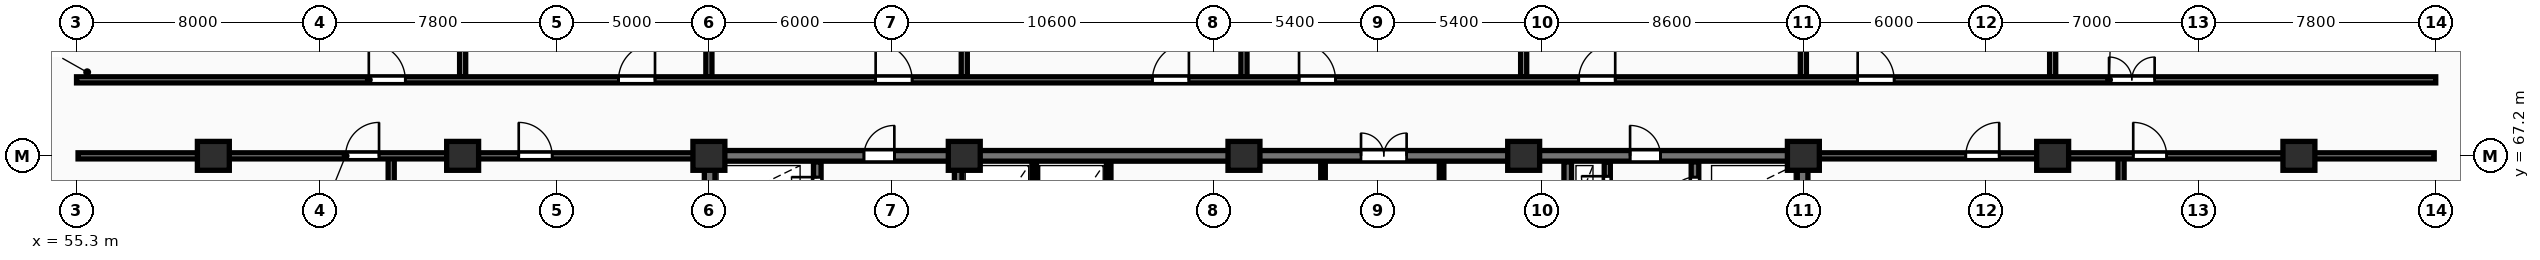
"""IFC4 building model, lengths in metres.
Left out: names, types, materials, properties, quantities, classifications, styles, units other than length and angle.
Written with IfcOpenShell. Run it as: python <this file> out.ifc"""

import sys

from ifc_helpers import new_model, si_unit, direction, frame, frame_2d, origin, origin_2d, place, context, subcontext, project, spatial, rectangle, extrude, element, fill, save


model = new_model("IFC4")
c1 = context("Model", 3, precision=1e-05, world=origin(), true_north=direction((0.0, 1.0)))
c2 = subcontext(c1, "Body", "Model", "MODEL_VIEW")
j1 = project(units=[si_unit("LENGTHUNIT", "METRE"), si_unit("PLANEANGLEUNIT", "RADIAN")], contexts=[c1])
p1 = place(None, origin())
s1 = spatial("IfcSite", under=j1, at=p1, CompositionType="ELEMENT")
p2 = place(p1, origin())
s2 = spatial("IfcBuilding", under=s1, at=p2, CompositionType="ELEMENT")
p3 = place(p2, frame((0.0, 0.0, 76.0)))
s3 = spatial("IfcBuildingStorey", under=s2, at=p3, CompositionType="ELEMENT", Elevation=76.0)
for number, where, z_axis, x_axis in (
    (1, (59.8, 67.2, 0.0), (0.0, 0.0, 1.0), (1.0, 0.0, 0.0)),
    (2, (68.0, 67.2, 0.0), (0.0, 0.0, 1.0), (1.0, 0.0, 0.0)),
    (3, (76.1, 67.2, 0.0), (0.0, 0.0, 1.0), (1.0, 0.0, 0.0)),
    (4, (84.5, 67.2, 0.0), (0.0, 0.0, 1.0), (1.0, 0.0, 0.0)),
    (5, (93.7, 67.2, 0.0), (0.0, 0.0, 1.0), (1.0, 0.0, 0.0)),
    (6, (102.9, 67.2, 0.0), (0.0, 0.0, 1.0), (1.0, 0.0, 0.0)),
    (7, (112.1, 67.2, 0.0), (0.0, 0.0, 1.0), (1.0, 0.0, 0.0)),
    (8, (120.3, 67.2, 0.0), (0.0, 0.0, 1.0), (1.0, 0.0, 0.0)),
    (9, (128.4, 67.2, 0.0), (0.0, 0.0, 1.0), (1.0, 0.0, 0.0)),
):
    element("IfcColumn", number, at=place(p3, frame(where, z_axis=z_axis, x_axis=x_axis)), inside=s3, PredefinedType="COLUMN", context=c2, shape_type="SweptSolid", body=[
        extrude(rectangle(XDim=1.05, YDim=0.95, at=origin_2d()), origin(), (0.0, 0.0, 1.0), 4.8),
    ])
for number, where, z_axis, x_axis in (
    (10, (76.125, 55.375, 0.0), (0.0, 0.0, 1.0), (0.0, 1.0, 0.0)),
    (11, (112.075, 55.375, 0.0), (0.0, 0.0, 1.0), (0.0, 1.0, 0.0)),
):
    element("IfcWall", number, at=place(p3, frame(where, z_axis=z_axis, x_axis=x_axis)), inside=s3, PredefinedType="SHEAR", context=c2, shape_type="SweptSolid", body=[
        extrude(rectangle(XDim=11.65, YDim=0.35, at=frame_2d((5.825, 0.0))), origin(), (0.0, 0.0, 1.0), 4.8),
    ])
p4 = place(p3, frame((75.95, 67.2, 0.0), z_axis=(0.0, 0.0, 1.0), x_axis=(1.0, 0.0, 0.0)))
e12 = element("IfcWall", 12, at=p4, inside=s3, PredefinedType="SHEAR", context=c2, shape_type="SweptSolid", body=[
    extrude(rectangle(XDim=36.3, YDim=0.35, at=frame_2d((18.15, 0.0))), origin(), (0.0, 0.0, 1.0), 4.8),
])
p5 = place(p4, frame((5.25, 0.0, 0.0)))
e13 = element("IfcOpeningElement", 13, at=p5, cuts=e12, PredefinedType="OPENING", context=c2, shape_type="SweptSolid", body=[
    extrude(rectangle(XDim=1.0, YDim=2.15, at=frame_2d((0.5, 1.075))), frame((0.0, 0.185, 0.0), z_axis=(0.0, -1.0, 0.0), x_axis=(1.0, 0.0, 0.0)), (0.0, 0.0, 1.0), 0.37),
])
p6 = place(p4, frame((21.6, 0.0, 0.0)))
e14 = element("IfcOpeningElement", 14, at=p6, cuts=e12, PredefinedType="OPENING", context=c2, shape_type="SweptSolid", body=[
    extrude(rectangle(XDim=1.5, YDim=2.2, at=frame_2d((0.75, 1.1))), frame((0.0, 0.185, 0.0), z_axis=(0.0, -1.0, 0.0), x_axis=(1.0, 0.0, 0.0)), (0.0, 0.0, 1.0), 0.37),
])
p7 = place(p4, frame((30.45, 0.0, 0.0)))
e15 = element("IfcOpeningElement", 15, at=p7, cuts=e12, PredefinedType="OPENING", context=c2, shape_type="SweptSolid", body=[
    extrude(rectangle(XDim=1.0, YDim=2.15, at=frame_2d((0.5, 1.075))), frame((0.0, 0.185, 0.0), z_axis=(0.0, -1.0, 0.0), x_axis=(1.0, 0.0, 0.0)), (0.0, 0.0, 1.0), 0.37),
])
p8 = place(p3, frame((79.665, 55.4, 0.0), z_axis=(0.0, 0.0, 1.0), x_axis=(0.0, 1.0, 0.0)))
e16 = element("IfcWall", 16, at=p8, inside=s3, PredefinedType="SHEAR", context=c2, shape_type="SweptSolid", body=[
    extrude(rectangle(XDim=11.6, YDim=0.25, at=frame_2d((5.8, 0.0))), origin(), (0.0, 0.0, 1.0), 4.8),
])
p9 = place(p8, frame((0.55, 0.0, 0.0)))
e17 = element("IfcOpeningElement", 17, at=p9, cuts=e16, PredefinedType="OPENING", context=c2, shape_type="SweptSolid", body=[
    extrude(rectangle(XDim=0.85, YDim=2.05, at=frame_2d((0.425, 1.025))), frame((0.0, 0.135, 0.0), z_axis=(0.0, -1.0, 0.0), x_axis=(1.0, 0.0, 0.0)), (0.0, 0.0, 1.0), 0.27),
])
p10 = place(p8, frame((8.4, 0.0, 0.0)))
e18 = element("IfcOpeningElement", 18, at=p10, cuts=e16, PredefinedType="OPENING", context=c2, shape_type="SweptSolid", body=[
    extrude(rectangle(XDim=1.1, YDim=2.1, at=frame_2d((0.55, 1.05))), frame((0.0, 0.135, 0.0), z_axis=(0.0, -1.0, 0.0), x_axis=(1.0, 0.0, 0.0)), (0.0, 0.0, 1.0), 0.27),
])
p11 = place(p8, frame((10.25, 0.0, 0.0)))
e19 = element("IfcOpeningElement", 19, at=p11, cuts=e16, PredefinedType="OPENING", context=c2, shape_type="SweptSolid", body=[
    extrude(rectangle(XDim=0.85, YDim=2.05, at=frame_2d((0.425, 1.025))), frame((0.0, 0.135, 0.0), z_axis=(0.0, -1.0, 0.0), x_axis=(1.0, 0.0, 0.0)), (0.0, 0.0, 1.0), 0.27),
])
p12 = place(p3, frame((84.3, 55.4, 0.0), z_axis=(0.0, 0.0, 1.0), x_axis=(0.0, 1.0, 0.0)))
e20 = element("IfcWall", 20, at=p12, inside=s3, PredefinedType="SHEAR", context=c2, shape_type="SweptSolid", body=[
    extrude(rectangle(XDim=11.6, YDim=0.25, at=frame_2d((5.8, 0.0))), origin(), (0.0, 0.0, 1.0), 4.8),
])
p13 = place(p12, frame((5.2, 0.0, 0.0)))
e21 = element("IfcOpeningElement", 21, at=p13, cuts=e20, PredefinedType="OPENING", context=c2, shape_type="SweptSolid", body=[
    extrude(rectangle(XDim=1.1, YDim=2.1, at=frame_2d((0.55, 1.05))), frame((0.0, 0.135, 0.0), z_axis=(0.0, -1.0, 0.0), x_axis=(1.0, 0.0, 0.0)), (0.0, 0.0, 1.0), 0.27),
])
for number, where, z_axis, x_axis in (
    (22, (86.8, 63.4, 0.0), (0.0, 0.0, 1.0), (0.0, 1.0, 0.0)),
    (23, (89.25, 63.4, 0.0), (0.0, 0.0, 1.0), (0.0, 1.0, 0.0)),
    (24, (96.3, 63.4, 0.0), (0.0, 0.0, 1.0), (0.0, 1.0, 0.0)),
    (25, (100.2, 63.4, 0.0), (0.0, 0.0, 1.0), (0.0, 1.0, 0.0)),
):
    element("IfcWall", number, at=place(p3, frame(where, z_axis=z_axis, x_axis=x_axis)), inside=s3, PredefinedType="PARTITIONING", context=c2, shape_type="SweptSolid", body=[
        extrude(rectangle(XDim=3.6, YDim=0.15, at=frame_2d((1.8, 0.0))), origin(), (0.0, 0.0, 1.0), 4.48),
    ])
p14 = place(p3, frame((105.65, 65.28, 0.0), z_axis=(0.0, 0.0, 1.0), x_axis=(0.0, 1.0, 0.0)))
e26 = element("IfcWall", 26, at=p14, inside=s3, PredefinedType="PARTITIONING", context=c2, shape_type="SweptSolid", body=[
    extrude(rectangle(XDim=1.72, YDim=0.2, at=frame_2d((0.86, 0.0))), origin(), (0.0, 0.0, 1.0), 4.48),
])
p15 = place(p14, frame((0.4, 0.0, 0.0)))
e27 = element("IfcOpeningElement", 27, at=p15, cuts=e26, PredefinedType="OPENING", context=c2, shape_type="SweptSolid", body=[
    extrude(rectangle(XDim=0.85, YDim=2.05, at=frame_2d((0.425, 1.025))), frame((0.0, 0.11, 0.0), z_axis=(0.0, -1.0, 0.0), x_axis=(1.0, 0.0, 0.0)), (0.0, 0.0, 1.0), 0.22),
])
p16 = place(p3, frame((104.35, 58.4, 0.0), z_axis=(0.0, 0.0, 1.0), x_axis=(0.0, 1.0, 0.0)))
e28 = element("IfcWall", 28, at=p16, inside=s3, PredefinedType="SHEAR", context=c2, shape_type="SweptSolid", body=[
    extrude(rectangle(XDim=8.6, YDim=0.25, at=frame_2d((4.3, 0.0))), origin(), (0.0, 0.0, 1.0), 4.8),
])
p17 = place(p16, frame((1.8, 0.0, 0.0)))
e29 = element("IfcOpeningElement", 29, at=p17, cuts=e28, PredefinedType="OPENING", context=c2, shape_type="SweptSolid", body=[
    extrude(rectangle(XDim=1.1, YDim=2.1, at=frame_2d((0.55, 1.05))), frame((0.0, 0.135, 0.0), z_axis=(0.0, -1.0, 0.0), x_axis=(1.0, 0.0, 0.0)), (0.0, 0.0, 1.0), 0.27),
])
p18 = place(p3, frame((108.535, 55.4, 0.0), z_axis=(0.0, 0.0, 1.0), x_axis=(0.0, 1.0, 0.0)))
e30 = element("IfcWall", 30, at=p18, inside=s3, PredefinedType="SHEAR", context=c2, shape_type="SweptSolid", body=[
    extrude(rectangle(XDim=11.6, YDim=0.25, at=frame_2d((5.8, 0.0))), origin(), (0.0, 0.0, 1.0), 4.8),
])
p19 = place(p18, frame((8.2, 0.0, 0.0)))
e31 = element("IfcOpeningElement", 31, at=p19, cuts=e30, PredefinedType="OPENING", context=c2, shape_type="SweptSolid", body=[
    extrude(rectangle(XDim=1.1, YDim=2.1, at=frame_2d((0.55, 1.05))), frame((0.0, 0.135, 0.0), z_axis=(0.0, -1.0, 0.0), x_axis=(1.0, 0.0, 0.0)), (0.0, 0.0, 1.0), 0.27),
])
p20 = place(p18, frame((10.25, 0.0, 0.0)))
e32 = element("IfcOpeningElement", 32, at=p20, cuts=e30, PredefinedType="OPENING", context=c2, shape_type="SweptSolid", body=[
    extrude(rectangle(XDim=0.85, YDim=2.05, at=frame_2d((0.425, 1.025))), frame((0.0, 0.135, 0.0), z_axis=(0.0, -1.0, 0.0), x_axis=(1.0, 0.0, 0.0)), (0.0, 0.0, 1.0), 0.27),
])
for number, where, z_axis, x_axis in (
    (33, (68.0, 69.8, 0.0), (0.0, 0.0, 1.0), (0.0, 1.0, 0.0)),
    (34, (76.1, 69.8, 0.0), (0.0, 0.0, 1.0), (0.0, 1.0, 0.0)),
    (35, (84.5, 69.8, 0.0), (0.0, 0.0, 1.0), (0.0, 1.0, 0.0)),
    (36, (93.7, 69.8, 0.0), (0.0, 0.0, 1.0), (0.0, 1.0, 0.0)),
    (37, (102.9, 69.8, 0.0), (0.0, 0.0, 1.0), (0.0, 1.0, 0.0)),
    (38, (112.1, 69.8, 0.0), (0.0, 0.0, 1.0), (0.0, 1.0, 0.0)),
    (39, (120.3, 69.8, 0.0), (0.0, 0.0, 1.0), (0.0, 1.0, 0.0)),
):
    element("IfcWall", number, at=place(p3, frame(where, z_axis=z_axis, x_axis=x_axis)), inside=s3, PredefinedType="PARTITIONING", context=c2, shape_type="SweptSolid", body=[
        extrude(rectangle(XDim=9.25, YDim=0.2, at=frame_2d((4.625, 0.0))), origin(), (0.0, 0.0, 1.0), 3.23),
    ])
p21 = place(p3, frame((55.3, 69.7, 0.0), z_axis=(0.0, 0.0, 1.0), x_axis=(1.0, 0.0, 0.0)))
e40 = element("IfcWall", 40, at=p21, inside=s3, PredefinedType="PARTITIONING", context=c2, shape_type="SweptSolid", body=[
    extrude(rectangle(XDim=77.6, YDim=0.2, at=frame_2d((38.8, 0.0))), origin(), (0.0, 0.0, 1.0), 4.48),
])
p22 = place(p21, frame((9.614, 0.0, 0.0)))
e41 = element("IfcOpeningElement", 41, at=p22, cuts=e40, PredefinedType="OPENING", context=c2, shape_type="SweptSolid", body=[
    extrude(rectangle(XDim=1.2, YDim=2.15, at=frame_2d((0.6, 1.075))), frame((0.0, 0.11, 0.0), z_axis=(0.0, -1.0, 0.0), x_axis=(1.0, 0.0, 0.0)), (0.0, 0.0, 1.0), 0.22),
])
p23 = place(p21, frame((17.828, 0.0, 0.0)))
e42 = element("IfcOpeningElement", 42, at=p23, cuts=e40, PredefinedType="OPENING", context=c2, shape_type="SweptSolid", body=[
    extrude(rectangle(XDim=1.2, YDim=2.15, at=frame_2d((0.6, 1.075))), frame((0.0, 0.11, 0.0), z_axis=(0.0, -1.0, 0.0), x_axis=(1.0, 0.0, 0.0)), (0.0, 0.0, 1.0), 0.22),
])
p24 = place(p21, frame((26.285, 0.0, 0.0)))
e43 = element("IfcOpeningElement", 43, at=p24, cuts=e40, PredefinedType="OPENING", context=c2, shape_type="SweptSolid", body=[
    extrude(rectangle(XDim=1.2, YDim=2.15, at=frame_2d((0.6, 1.075))), frame((0.0, 0.11, 0.0), z_axis=(0.0, -1.0, 0.0), x_axis=(1.0, 0.0, 0.0)), (0.0, 0.0, 1.0), 0.22),
])
p25 = place(p21, frame((35.389, 0.0, 0.0)))
e44 = element("IfcOpeningElement", 44, at=p25, cuts=e40, PredefinedType="OPENING", context=c2, shape_type="SweptSolid", body=[
    extrude(rectangle(XDim=1.2, YDim=2.15, at=frame_2d((0.6, 1.075))), frame((0.0, 0.11, 0.0), z_axis=(0.0, -1.0, 0.0), x_axis=(1.0, 0.0, 0.0)), (0.0, 0.0, 1.0), 0.22),
])
p26 = place(p21, frame((40.211, 0.0, 0.0)))
e45 = element("IfcOpeningElement", 45, at=p26, cuts=e40, PredefinedType="OPENING", context=c2, shape_type="SweptSolid", body=[
    extrude(rectangle(XDim=1.2, YDim=2.15, at=frame_2d((0.6, 1.075))), frame((0.0, 0.11, 0.0), z_axis=(0.0, -1.0, 0.0), x_axis=(1.0, 0.0, 0.0)), (0.0, 0.0, 1.0), 0.22),
])
p27 = place(p21, frame((49.411, 0.0, 0.0)))
e46 = element("IfcOpeningElement", 46, at=p27, cuts=e40, PredefinedType="OPENING", context=c2, shape_type="SweptSolid", body=[
    extrude(rectangle(XDim=1.2, YDim=2.15, at=frame_2d((0.6, 1.075))), frame((0.0, 0.11, 0.0), z_axis=(0.0, -1.0, 0.0), x_axis=(1.0, 0.0, 0.0)), (0.0, 0.0, 1.0), 0.22),
])
p28 = place(p21, frame((58.586, 0.0, 0.0)))
e47 = element("IfcOpeningElement", 47, at=p28, cuts=e40, PredefinedType="OPENING", context=c2, shape_type="SweptSolid", body=[
    extrude(rectangle(XDim=1.2, YDim=2.15, at=frame_2d((0.6, 1.075))), frame((0.0, 0.11, 0.0), z_axis=(0.0, -1.0, 0.0), x_axis=(1.0, 0.0, 0.0)), (0.0, 0.0, 1.0), 0.22),
])
p29 = place(p21, frame((66.854, 0.0, 0.0)))
e48 = element("IfcOpeningElement", 48, at=p29, cuts=e40, PredefinedType="OPENING", context=c2, shape_type="SweptSolid", body=[
    extrude(rectangle(XDim=1.5, YDim=2.18, at=frame_2d((0.75, 1.09))), frame((0.0, 0.11, 0.0), z_axis=(0.0, -1.0, 0.0), x_axis=(1.0, 0.0, 0.0)), (0.0, 0.0, 1.0), 0.22),
])
p30 = place(p3, frame((65.65, 50.95, 0.0), z_axis=(0.0, 0.0, 1.0), x_axis=(0.0, 1.0, 0.0)))
e49 = element("IfcWall", 49, at=p30, inside=s3, PredefinedType="PARTITIONING", context=c2, shape_type="SweptSolid", body=[
    extrude(rectangle(XDim=16.2, YDim=0.2, at=frame_2d((8.1, 0.0))), origin(), (0.0, 0.0, 1.0), 4.48),
])
p31 = place(p3, frame((55.35, 67.2, 0.0), z_axis=(0.0, 0.0, 1.0), x_axis=(1.0, 0.0, 0.0)))
e50 = element("IfcWall", 50, at=p31, inside=s3, PredefinedType="PARTITIONING", context=c2, shape_type="SweptSolid", body=[
    extrude(rectangle(XDim=20.6, YDim=0.2, at=frame_2d((10.3, 0.0))), origin(), (0.0, 0.0, 1.0), 3.23),
])
p32 = place(p31, frame((8.8, 0.0, 0.0)))
e51 = element("IfcOpeningElement", 51, at=p32, cuts=e50, PredefinedType="OPENING", context=c2, shape_type="SweptSolid", body=[
    extrude(rectangle(XDim=1.1, YDim=2.1, at=frame_2d((0.55, 1.05))), frame((0.0, 0.11, 0.0), z_axis=(0.0, -1.0, 0.0), x_axis=(1.0, 0.0, 0.0)), (0.0, 0.0, 1.0), 0.22),
])
p33 = place(p31, frame((14.495, 0.0, 0.0)))
e52 = element("IfcOpeningElement", 52, at=p33, cuts=e50, PredefinedType="OPENING", context=c2, shape_type="SweptSolid", body=[
    extrude(rectangle(XDim=1.1, YDim=2.1, at=frame_2d((0.55, 1.05))), frame((0.0, 0.11, 0.0), z_axis=(0.0, -1.0, 0.0), x_axis=(1.0, 0.0, 0.0)), (0.0, 0.0, 1.0), 0.22),
])
p34 = place(p3, frame((122.55, 50.95, 0.0), z_axis=(0.0, 0.0, 1.0), x_axis=(0.0, 1.0, 0.0)))
e53 = element("IfcWall", 53, at=p34, inside=s3, PredefinedType="PARTITIONING", context=c2, shape_type="SweptSolid", body=[
    extrude(rectangle(XDim=16.2, YDim=0.2, at=frame_2d((8.1, 0.0))), origin(), (0.0, 0.0, 1.0), 4.48),
])
p35 = place(p3, frame((112.25, 67.2, 0.0), z_axis=(0.0, 0.0, 1.0), x_axis=(1.0, 0.0, 0.0)))
e54 = element("IfcWall", 54, at=p35, inside=s3, PredefinedType="PARTITIONING", context=c2, shape_type="SweptSolid", body=[
    extrude(rectangle(XDim=20.6, YDim=0.2, at=frame_2d((10.3, 0.0))), origin(), (0.0, 0.0, 1.0), 3.23),
])
p36 = place(p35, frame((5.192, 0.0, 0.0)))
e55 = element("IfcOpeningElement", 55, at=p36, cuts=e54, PredefinedType="OPENING", context=c2, shape_type="SweptSolid", body=[
    extrude(rectangle(XDim=1.1, YDim=2.1, at=frame_2d((0.55, 1.05))), frame((0.0, 0.11, 0.0), z_axis=(0.0, -1.0, 0.0), x_axis=(1.0, 0.0, 0.0)), (0.0, 0.0, 1.0), 0.22),
])
p37 = place(p35, frame((10.7, 0.0, 0.0)))
e56 = element("IfcOpeningElement", 56, at=p37, cuts=e54, PredefinedType="OPENING", context=c2, shape_type="SweptSolid", body=[
    extrude(rectangle(XDim=1.1, YDim=2.1, at=frame_2d((0.55, 1.05))), frame((0.0, 0.11, 0.0), z_axis=(0.0, -1.0, 0.0), x_axis=(1.0, 0.0, 0.0)), (0.0, 0.0, 1.0), 0.22),
])
p38 = place(p5, origin())
e57 = element("IfcDoor", 57, at=p38, inside=s3, OperationType="SINGLE_SWING_RIGHT", PredefinedType="DOOR", context=c2, shape_type="SweptSolid", body=[
    extrude(rectangle(XDim=1.0, YDim=2.15, at=frame_2d((0.5, 1.075))), frame((0.0, 0.025, 0.0), z_axis=(0.0, -1.0, 0.0), x_axis=(1.0, 0.0, 0.0)), (0.0, 0.0, 1.0), 0.05),
])
fill(e13, e57)
p39 = place(p6, origin())
e58 = element("IfcDoor", 58, at=p39, inside=s3, OperationType="DOUBLE_DOOR_SINGLE_SWING", PredefinedType="DOOR", context=c2, shape_type="SweptSolid", body=[
    extrude(rectangle(XDim=1.5, YDim=2.2, at=frame_2d((0.75, 1.1))), frame((0.0, 0.025, 0.0), z_axis=(0.0, -1.0, 0.0), x_axis=(1.0, 0.0, 0.0)), (0.0, 0.0, 1.0), 0.05),
])
fill(e14, e58)
p40 = place(p7, origin())
e59 = element("IfcDoor", 59, at=p40, inside=s3, OperationType="SINGLE_SWING_LEFT", PredefinedType="DOOR", context=c2, shape_type="SweptSolid", body=[
    extrude(rectangle(XDim=1.0, YDim=2.15, at=frame_2d((0.5, 1.075))), frame((0.0, 0.025, 0.0), z_axis=(0.0, -1.0, 0.0), x_axis=(1.0, 0.0, 0.0)), (0.0, 0.0, 1.0), 0.05),
])
fill(e15, e59)
p41 = place(p11, origin())
e60 = element("IfcDoor", 60, at=p41, inside=s3, OperationType="SINGLE_SWING_RIGHT", PredefinedType="DOOR", context=c2, shape_type="SweptSolid", body=[
    extrude(rectangle(XDim=0.85, YDim=2.05, at=frame_2d((0.425, 1.025))), frame((0.0, 0.025, 0.0), z_axis=(0.0, -1.0, 0.0), x_axis=(1.0, 0.0, 0.0)), (0.0, 0.0, 1.0), 0.05),
])
fill(e19, e60)
p42 = place(p15, origin())
e61 = element("IfcDoor", 61, at=p42, inside=s3, OperationType="SINGLE_SWING_RIGHT", PredefinedType="DOOR", context=c2, shape_type="SweptSolid", body=[
    extrude(rectangle(XDim=0.85, YDim=2.05, at=frame_2d((0.425, 1.025))), frame((0.0, 0.025, 0.0), z_axis=(0.0, -1.0, 0.0), x_axis=(1.0, 0.0, 0.0)), (0.0, 0.0, 1.0), 0.05),
])
fill(e27, e61)
p43 = place(p20, origin())
e62 = element("IfcDoor", 62, at=p43, inside=s3, OperationType="SINGLE_SWING_LEFT", PredefinedType="DOOR", context=c2, shape_type="SweptSolid", body=[
    extrude(rectangle(XDim=0.85, YDim=2.05, at=frame_2d((0.425, 1.025))), frame((0.0, 0.025, 0.0), z_axis=(0.0, -1.0, 0.0), x_axis=(1.0, 0.0, 0.0)), (0.0, 0.0, 1.0), 0.05),
])
fill(e32, e62)
p44 = place(p22, origin())
e63 = element("IfcDoor", 63, at=p44, inside=s3, OperationType="SINGLE_SWING_LEFT", PredefinedType="DOOR", context=c2, shape_type="SweptSolid", body=[
    extrude(rectangle(XDim=1.2, YDim=2.15, at=frame_2d((0.6, 1.075))), frame((0.0, 0.025, 0.0), z_axis=(0.0, -1.0, 0.0), x_axis=(1.0, 0.0, 0.0)), (0.0, 0.0, 1.0), 0.05),
])
fill(e41, e63)
p45 = place(p23, origin())
e64 = element("IfcDoor", 64, at=p45, inside=s3, OperationType="SINGLE_SWING_RIGHT", PredefinedType="DOOR", context=c2, shape_type="SweptSolid", body=[
    extrude(rectangle(XDim=1.2, YDim=2.15, at=frame_2d((0.6, 1.075))), frame((0.0, 0.025, 0.0), z_axis=(0.0, -1.0, 0.0), x_axis=(1.0, 0.0, 0.0)), (0.0, 0.0, 1.0), 0.05),
])
fill(e42, e64)
p46 = place(p24, origin())
e65 = element("IfcDoor", 65, at=p46, inside=s3, OperationType="SINGLE_SWING_LEFT", PredefinedType="DOOR", context=c2, shape_type="SweptSolid", body=[
    extrude(rectangle(XDim=1.2, YDim=2.15, at=frame_2d((0.6, 1.075))), frame((0.0, 0.025, 0.0), z_axis=(0.0, -1.0, 0.0), x_axis=(1.0, 0.0, 0.0)), (0.0, 0.0, 1.0), 0.05),
])
fill(e43, e65)
p47 = place(p25, origin())
e66 = element("IfcDoor", 66, at=p47, inside=s3, OperationType="SINGLE_SWING_RIGHT", PredefinedType="DOOR", context=c2, shape_type="SweptSolid", body=[
    extrude(rectangle(XDim=1.2, YDim=2.15, at=frame_2d((0.6, 1.075))), frame((0.0, 0.025, 0.0), z_axis=(0.0, -1.0, 0.0), x_axis=(1.0, 0.0, 0.0)), (0.0, 0.0, 1.0), 0.05),
])
fill(e44, e66)
p48 = place(p26, origin())
e67 = element("IfcDoor", 67, at=p48, inside=s3, OperationType="SINGLE_SWING_LEFT", PredefinedType="DOOR", context=c2, shape_type="SweptSolid", body=[
    extrude(rectangle(XDim=1.2, YDim=2.15, at=frame_2d((0.6, 1.075))), frame((0.0, 0.025, 0.0), z_axis=(0.0, -1.0, 0.0), x_axis=(1.0, 0.0, 0.0)), (0.0, 0.0, 1.0), 0.05),
])
fill(e45, e67)
p49 = place(p27, origin())
e68 = element("IfcDoor", 68, at=p49, inside=s3, OperationType="SINGLE_SWING_RIGHT", PredefinedType="DOOR", context=c2, shape_type="SweptSolid", body=[
    extrude(rectangle(XDim=1.2, YDim=2.15, at=frame_2d((0.6, 1.075))), frame((0.0, 0.025, 0.0), z_axis=(0.0, -1.0, 0.0), x_axis=(1.0, 0.0, 0.0)), (0.0, 0.0, 1.0), 0.05),
])
fill(e46, e68)
p50 = place(p28, origin())
e69 = element("IfcDoor", 69, at=p50, inside=s3, OperationType="SINGLE_SWING_LEFT", PredefinedType="DOOR", context=c2, shape_type="SweptSolid", body=[
    extrude(rectangle(XDim=1.2, YDim=2.15, at=frame_2d((0.6, 1.075))), frame((0.0, 0.025, 0.0), z_axis=(0.0, -1.0, 0.0), x_axis=(1.0, 0.0, 0.0)), (0.0, 0.0, 1.0), 0.05),
])
fill(e47, e69)
p51 = place(p29, origin())
e70 = element("IfcDoor", 70, at=p51, inside=s3, OperationType="DOUBLE_DOOR_SINGLE_SWING", PredefinedType="DOOR", context=c2, shape_type="SweptSolid", body=[
    extrude(rectangle(XDim=1.5, YDim=2.18, at=frame_2d((0.75, 1.09))), frame((0.0, 0.025, 0.0), z_axis=(0.0, -1.0, 0.0), x_axis=(1.0, 0.0, 0.0)), (0.0, 0.0, 1.0), 0.05),
])
fill(e48, e70)
p52 = place(p32, origin())
e71 = element("IfcDoor", 71, at=p52, inside=s3, OperationType="SINGLE_SWING_RIGHT", PredefinedType="DOOR", context=c2, shape_type="SweptSolid", body=[
    extrude(rectangle(XDim=1.1, YDim=2.1, at=frame_2d((0.55, 1.05))), frame((0.0, 0.025, 0.0), z_axis=(0.0, -1.0, 0.0), x_axis=(1.0, 0.0, 0.0)), (0.0, 0.0, 1.0), 0.05),
])
fill(e51, e71)
p53 = place(p33, origin())
e72 = element("IfcDoor", 72, at=p53, inside=s3, OperationType="SINGLE_SWING_LEFT", PredefinedType="DOOR", context=c2, shape_type="SweptSolid", body=[
    extrude(rectangle(XDim=1.1, YDim=2.1, at=frame_2d((0.55, 1.05))), frame((0.0, 0.025, 0.0), z_axis=(0.0, -1.0, 0.0), x_axis=(1.0, 0.0, 0.0)), (0.0, 0.0, 1.0), 0.05),
])
fill(e52, e72)
p54 = place(p36, origin())
e73 = element("IfcDoor", 73, at=p54, inside=s3, OperationType="SINGLE_SWING_RIGHT", PredefinedType="DOOR", context=c2, shape_type="SweptSolid", body=[
    extrude(rectangle(XDim=1.1, YDim=2.1, at=frame_2d((0.55, 1.05))), frame((0.0, 0.025, 0.0), z_axis=(0.0, -1.0, 0.0), x_axis=(1.0, 0.0, 0.0)), (0.0, 0.0, 1.0), 0.05),
])
fill(e55, e73)
p55 = place(p37, origin())
e74 = element("IfcDoor", 74, at=p55, inside=s3, OperationType="SINGLE_SWING_LEFT", PredefinedType="DOOR", context=c2, shape_type="SweptSolid", body=[
    extrude(rectangle(XDim=1.1, YDim=2.1, at=frame_2d((0.55, 1.05))), frame((0.0, 0.025, 0.0), z_axis=(0.0, -1.0, 0.0), x_axis=(1.0, 0.0, 0.0)), (0.0, 0.0, 1.0), 0.05),
])
fill(e56, e74)
save(model, sys.argv[1])
